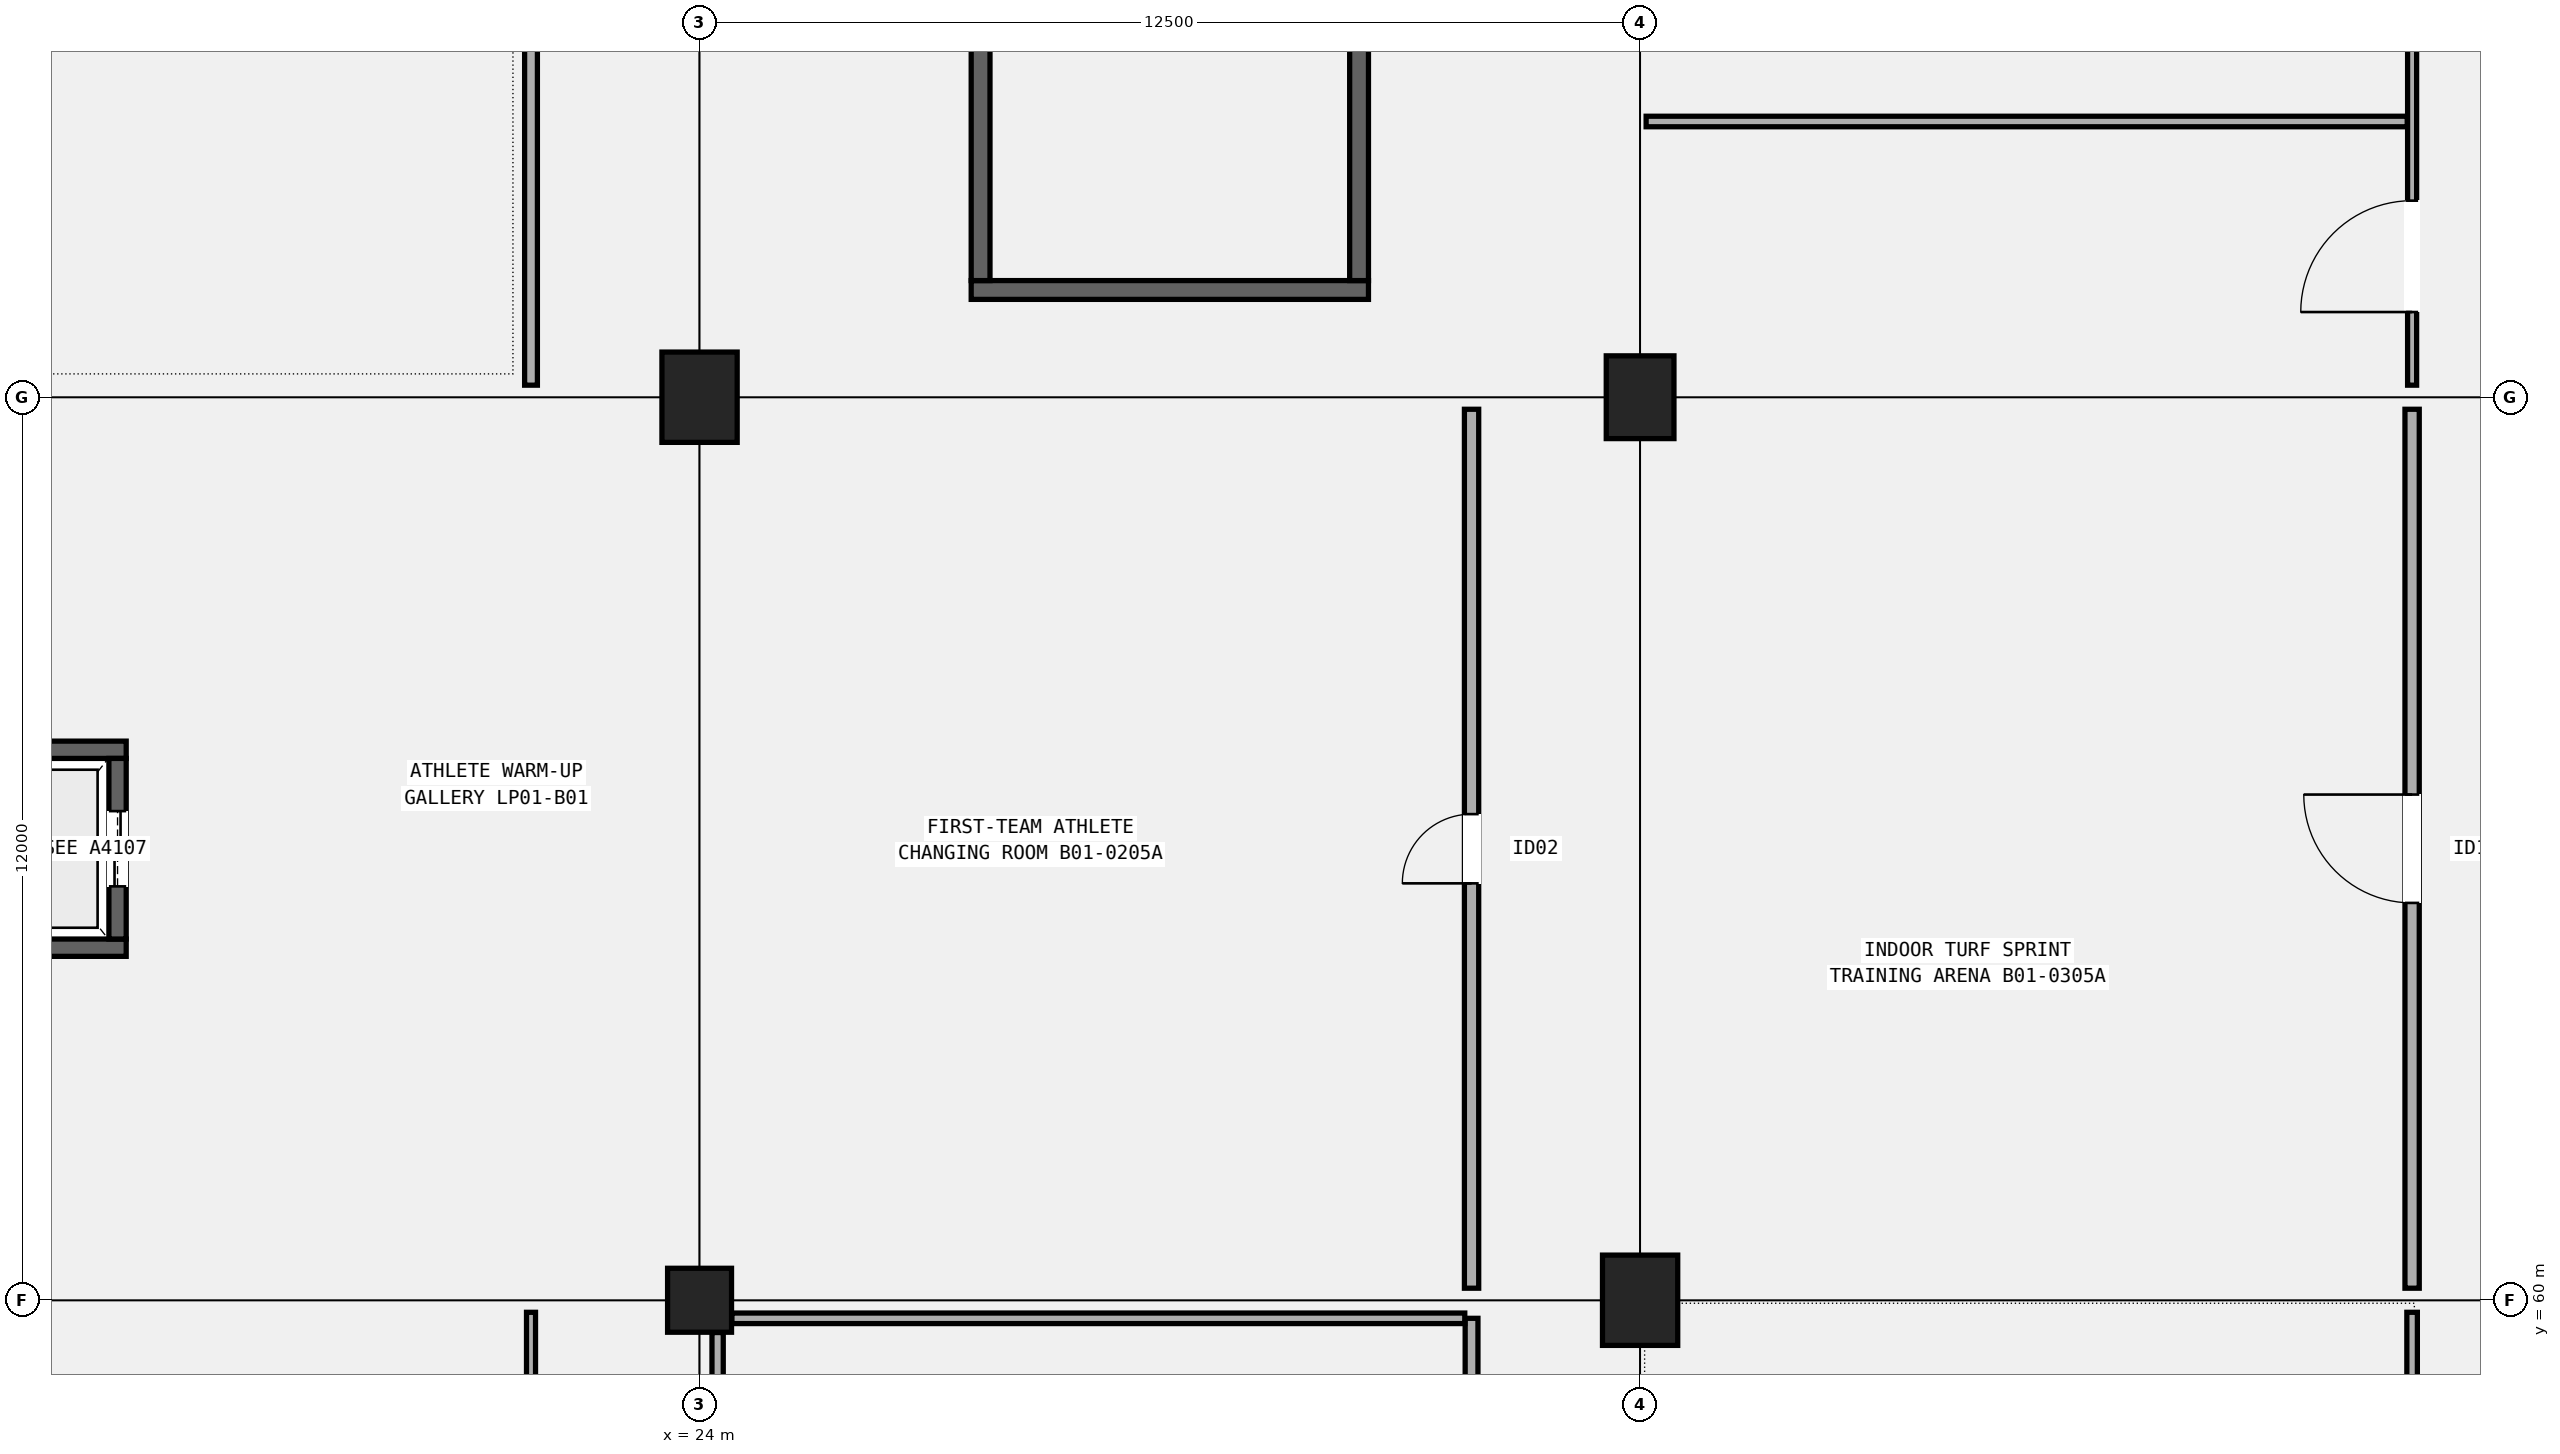
"""IFC4 building model, lengths in metres.
Left out: names, types, materials, properties, quantities, classifications, styles, units other than length and angle.
Written with IfcOpenShell. Run it as: python <this file> out.ifc"""

import sys

from ifc_helpers import new_model, si_unit, direction, frame, frame_2d, origin, origin_2d, place, context, subcontext, project, spatial, rectangle, circle, extrude, element, fill, save


model = new_model("IFC4")
c1 = context("Model", 3, precision=1e-05, world=origin(), true_north=direction((0.0, 1.0)))
c2 = subcontext(c1, "Body", "Model", "MODEL_VIEW")
j1 = project(units=[si_unit("LENGTHUNIT", "METRE"), si_unit("PLANEANGLEUNIT", "RADIAN")], contexts=[c1])
p1 = place(None, origin())
s1 = spatial("IfcSite", under=j1, at=p1, CompositionType="ELEMENT")
p2 = place(p1, origin())
s2 = spatial("IfcBuilding", under=s1, at=p2, CompositionType="ELEMENT")
p3 = place(p2, frame((0.0, 0.0, -4.8)))
s3 = spatial("IfcBuildingStorey", under=s2, at=p3, CompositionType="ELEMENT", Elevation=-4.8)
p4 = place(p3, frame((24.0, 60.0, 0.0), z_axis=(0.0, 0.0, 1.0), x_axis=(1.0, 0.0, 0.0)))
e1 = element("IfcColumn", 1, at=p4, inside=s3, PredefinedType="COLUMN", context=c2, shape_type="SweptSolid", body=[
    extrude(circle(Radius=0.425, at=origin_2d()), origin(), (0.0, 0.0, 1.0), 4.8),
])
for number, where, z_axis, x_axis in (
    (2, (24.0, 72.0, 0.0), (0.0, 0.0, 1.0), (1.0, 0.0, 0.0)),
    (3, (36.5, 60.0, 0.0), (0.0, 0.0, 1.0), (1.0, 0.0, 0.0)),
):
    element("IfcColumn", number, at=place(p3, frame(where, z_axis=z_axis, x_axis=x_axis)), inside=s3, PredefinedType="COLUMN", context=c2, shape_type="SweptSolid", body=[
        extrude(rectangle(XDim=1.0, YDim=1.2, at=origin_2d()), origin(), (0.0, 0.0, 1.0), 4.8),
    ])
p5 = place(p3, frame((36.5, 72.0, 0.0), z_axis=(0.0, 0.0, 1.0), x_axis=(1.0, 0.0, 0.0)))
e4 = element("IfcColumn", 4, at=p5, inside=s3, PredefinedType="COLUMN", context=c2, shape_type="SweptSolid", body=[
    extrude(rectangle(XDim=0.9, YDim=1.1, at=origin_2d()), origin(), (0.0, 0.0, 1.0), 4.8),
])
p6 = place(p3, frame((27.61, 73.425, 0.0), z_axis=(0.0, 0.0, 1.0), x_axis=(1.0, 0.0, 0.0)))
e5 = element("IfcWall", 5, at=p6, inside=s3, PredefinedType="SHEAR", context=c2, shape_type="SweptSolid", body=[
    extrude(rectangle(XDim=5.28, YDim=0.25, at=frame_2d((2.64, 0.0))), origin(), (0.0, 0.0, 1.0), 4.5),
])
for number, where, z_axis, x_axis in (
    (6, (27.735, 73.55, 0.0), (0.0, 0.0, 1.0), (0.0, 1.0, 0.0)),
    (7, (32.765, 73.55, 0.0), (0.0, 0.0, 1.0), (0.0, 1.0, 0.0)),
):
    element("IfcWall", number, at=place(p3, frame(where, z_axis=z_axis, x_axis=x_axis)), inside=s3, PredefinedType="SHEAR", context=c2, shape_type="SweptSolid", body=[
        extrude(rectangle(XDim=8.9, YDim=0.25, at=frame_2d((4.45, 0.0))), origin(), (0.0, 0.0, 1.0), 4.5),
    ])
for number, where, z_axis, x_axis in (
    (8, (14.02, 64.685, -0.65), (0.0, 0.0, 1.0), (1.0, 0.0, 0.0)),
    (9, (14.02, 67.315, -0.65), (0.0, 0.0, 1.0), (1.0, 0.0, 0.0)),
):
    element("IfcWall", number, at=place(p3, frame(where, z_axis=z_axis, x_axis=x_axis)), inside=s3, PredefinedType="SHEAR", context=c2, shape_type="SweptSolid", body=[
        extrude(rectangle(XDim=2.36, YDim=0.23, at=frame_2d((1.18, 0.0))), origin(), (0.0, 0.0, 1.0), 4.5),
    ])
p7 = place(p3, frame((16.265, 64.8, -0.65), z_axis=(0.0, 0.0, 1.0), x_axis=(0.0, 1.0, 0.0)))
e10 = element("IfcWall", 10, at=p7, inside=s3, PredefinedType="SHEAR", context=c2, shape_type="SweptSolid", body=[
    extrude(rectangle(XDim=2.4, YDim=0.23, at=frame_2d((1.2, 0.0))), origin(), (0.0, 0.0, 1.0), 4.5),
])
p8 = place(p7, frame((0.7, 0.0, 0.65)))
e11 = element("IfcOpeningElement", 11, at=p8, cuts=e10, PredefinedType="OPENING", context=c2, shape_type="SweptSolid", body=[
    extrude(rectangle(XDim=1.0, YDim=2.15, at=frame_2d((0.5, 1.075))), frame((0.0, 0.125, 0.0), z_axis=(0.0, -1.0, 0.0), x_axis=(1.0, 0.0, 0.0)), (0.0, 0.0, 1.0), 0.25),
])
p9 = place(p3, frame((21.76, 48.16, 0.0), z_axis=(0.0, 0.0, 1.0), x_axis=(0.0, 1.0, 0.0)))
e12 = element("IfcWall", 12, at=p9, inside=s3, PredefinedType="PARTITIONING", context=c2, shape_type="SweptSolid", body=[
    extrude(rectangle(XDim=11.68, YDim=0.12, at=frame_2d((5.84, 0.0))), origin(), (0.0, 0.0, 1.0), 3.92),
])
p10 = place(p9, frame((1.377, 0.0, 0.0)))
e13 = element("IfcOpeningElement", 13, at=p10, cuts=e12, PredefinedType="OPENING", context=c2, shape_type="SweptSolid", body=[
    extrude(rectangle(XDim=1.3, YDim=2.24, at=frame_2d((0.65, 1.12))), frame((0.0, 0.07, 0.0), z_axis=(0.0, -1.0, 0.0), x_axis=(1.0, 0.0, 0.0)), (0.0, 0.0, 1.0), 0.14),
])
p11 = place(p9, frame((7.282, 0.0, 0.0)))
e14 = element("IfcOpeningElement", 14, at=p11, cuts=e12, PredefinedType="OPENING", context=c2, shape_type="SweptSolid", body=[
    extrude(rectangle(XDim=1.33, YDim=2.22, at=frame_2d((0.665, 1.11))), frame((0.0, 0.07, 0.0), z_axis=(0.0, -1.0, 0.0), x_axis=(1.0, 0.0, 0.0)), (0.0, 0.0, 1.0), 0.14),
])
p12 = place(p3, frame((21.76, 72.16, 0.0), z_axis=(0.0, 0.0, 1.0), x_axis=(0.0, 1.0, 0.0)))
e15 = element("IfcWall", 15, at=p12, inside=s3, PredefinedType="PARTITIONING", context=c2, shape_type="SweptSolid", body=[
    extrude(rectangle(XDim=11.68, YDim=0.17, at=frame_2d((5.84, 0.0))), origin(), (0.0, 0.0, 1.0), 3.92),
])
p13 = place(p12, frame((5.16, 0.0, 0.0)))
e16 = element("IfcOpeningElement", 16, at=p13, cuts=e15, PredefinedType="OPENING", context=c2, shape_type="SweptSolid", body=[
    extrude(rectangle(XDim=1.36, YDim=2.25, at=frame_2d((0.68, 1.125))), frame((0.0, 0.095, 0.0), z_axis=(0.0, -1.0, 0.0), x_axis=(1.0, 0.0, 0.0)), (0.0, 0.0, 1.0), 0.19),
])
p14 = place(p3, frame((34.26, 48.24, 0.0), z_axis=(0.0, 0.0, 1.0), x_axis=(0.0, 1.0, 0.0)))
e17 = element("IfcWall", 17, at=p14, inside=s3, PredefinedType="PARTITIONING", context=c2, shape_type="SweptSolid", body=[
    extrude(rectangle(XDim=11.52, YDim=0.17, at=frame_2d((5.76, 0.0))), origin(), (0.0, 0.0, 1.0), 3.92),
])
p15 = place(p14, frame((0.523, 0.0, 0.0)))
e18 = element("IfcOpeningElement", 18, at=p15, cuts=e17, PredefinedType="OPENING", context=c2, shape_type="SweptSolid", body=[
    extrude(rectangle(XDim=1.7, YDim=2.32, at=frame_2d((0.85, 1.16))), frame((0.0, 0.095, 0.0), z_axis=(0.0, -1.0, 0.0), x_axis=(1.0, 0.0, 0.0)), (0.0, 0.0, 1.0), 0.19),
])
p16 = place(p14, frame((4.06, 0.0, 0.0)))
e19 = element("IfcOpeningElement", 19, at=p16, cuts=e17, PredefinedType="OPENING", context=c2, shape_type="SweptSolid", body=[
    extrude(rectangle(XDim=1.76, YDim=2.3, at=frame_2d((0.88, 1.15))), frame((0.0, 0.095, 0.0), z_axis=(0.0, -1.0, 0.0), x_axis=(1.0, 0.0, 0.0)), (0.0, 0.0, 1.0), 0.19),
])
p17 = place(p14, frame((8.876, 0.0, 0.0)))
e20 = element("IfcOpeningElement", 20, at=p17, cuts=e17, PredefinedType="OPENING", context=c2, shape_type="SweptSolid", body=[
    extrude(rectangle(XDim=0.9, YDim=2.06, at=frame_2d((0.45, 1.03))), frame((0.0, 0.095, 0.0), z_axis=(0.0, -1.0, 0.0), x_axis=(1.0, 0.0, 0.0)), (0.0, 0.0, 1.0), 0.19),
])
p18 = place(p3, frame((24.429, 59.76, 0.0), z_axis=(0.0, 0.0, 1.0), x_axis=(1.0, 0.0, 0.0)))
e21 = element("IfcWall", 21, at=p18, inside=s3, PredefinedType="PARTITIONING", context=c2, shape_type="SweptSolid", body=[
    extrude(rectangle(XDim=9.741, YDim=0.14, at=frame_2d((4.871, 0.0))), origin(), (0.0, 0.0, 1.0), 3.62),
])
p19 = place(p3, frame((24.24, 48.504, 0.0), z_axis=(0.0, 0.0, 1.0), x_axis=(0.0, 1.0, 0.0)))
e22 = element("IfcWall", 22, at=p19, inside=s3, PredefinedType="PARTITIONING", context=c2, shape_type="SweptSolid", body=[
    extrude(rectangle(XDim=11.067, YDim=0.15, at=frame_2d((5.534, 0.0))), origin(), (0.0, 0.0, 1.0), 3.52),
])
p20 = place(p3, frame((34.26, 60.16, 0.0), z_axis=(0.0, 0.0, 1.0), x_axis=(0.0, 1.0, 0.0)))
e23 = element("IfcWall", 23, at=p20, inside=s3, PredefinedType="PARTITIONING", context=c2, shape_type="SweptSolid", body=[
    extrude(rectangle(XDim=11.68, YDim=0.19, at=frame_2d((5.84, 0.0))), origin(), (0.0, 0.0, 1.0), 3.92),
])
p21 = place(p20, frame((5.38, 0.0, 0.0)))
e24 = element("IfcOpeningElement", 24, at=p21, cuts=e23, PredefinedType="OPENING", context=c2, shape_type="SweptSolid", body=[
    extrude(rectangle(XDim=0.92, YDim=2.1, at=frame_2d((0.46, 1.05))), frame((0.0, 0.105, 0.0), z_axis=(0.0, -1.0, 0.0), x_axis=(1.0, 0.0, 0.0)), (0.0, 0.0, 1.0), 0.21),
])
p22 = place(p3, frame((46.76, 48.16, 0.0), z_axis=(0.0, 0.0, 1.0), x_axis=(0.0, 1.0, 0.0)))
e25 = element("IfcWall", 25, at=p22, inside=s3, PredefinedType="PARTITIONING", context=c2, shape_type="SweptSolid", body=[
    extrude(rectangle(XDim=11.68, YDim=0.14, at=frame_2d((5.84, 0.0))), origin(), (0.0, 0.0, 1.0), 3.92),
])
p23 = place(p22, frame((2.404, 0.0, 0.0)))
e26 = element("IfcOpeningElement", 26, at=p23, cuts=e25, PredefinedType="OPENING", context=c2, shape_type="SweptSolid", body=[
    extrude(rectangle(XDim=1.36, YDim=2.25, at=frame_2d((0.68, 1.125))), frame((0.0, 0.08, 0.0), z_axis=(0.0, -1.0, 0.0), x_axis=(1.0, 0.0, 0.0)), (0.0, 0.0, 1.0), 0.16),
])
p24 = place(p22, frame((8.304, 0.0, 0.0)))
e27 = element("IfcOpeningElement", 27, at=p24, cuts=e25, PredefinedType="OPENING", context=c2, shape_type="SweptSolid", body=[
    extrude(rectangle(XDim=1.4, YDim=2.24, at=frame_2d((0.7, 1.12))), frame((0.0, 0.08, 0.0), z_axis=(0.0, -1.0, 0.0), x_axis=(1.0, 0.0, 0.0)), (0.0, 0.0, 1.0), 0.16),
])
p25 = place(p3, frame((46.76, 60.16, 0.0), z_axis=(0.0, 0.0, 1.0), x_axis=(0.0, 1.0, 0.0)))
e28 = element("IfcWall", 28, at=p25, inside=s3, PredefinedType="PARTITIONING", context=c2, shape_type="SweptSolid", body=[
    extrude(rectangle(XDim=11.68, YDim=0.19, at=frame_2d((5.84, 0.0))), origin(), (0.0, 0.0, 1.0), 3.92),
])
p26 = place(p25, frame((5.12, 0.0, 0.0)))
e29 = element("IfcOpeningElement", 29, at=p26, cuts=e28, PredefinedType="OPENING", context=c2, shape_type="SweptSolid", body=[
    extrude(rectangle(XDim=1.44, YDim=2.26, at=frame_2d((0.72, 1.13))), frame((0.0, 0.105, 0.0), z_axis=(0.0, -1.0, 0.0), x_axis=(1.0, 0.0, 0.0)), (0.0, 0.0, 1.0), 0.21),
])
p27 = place(p3, frame((46.76, 72.16, 0.0), z_axis=(0.0, 0.0, 1.0), x_axis=(0.0, 1.0, 0.0)))
e30 = element("IfcWall", 30, at=p27, inside=s3, PredefinedType="PARTITIONING", context=c2, shape_type="SweptSolid", body=[
    extrude(rectangle(XDim=11.68, YDim=0.12, at=frame_2d((5.84, 0.0))), origin(), (0.0, 0.0, 1.0), 3.92),
])
p28 = place(p27, frame((0.972, 0.0, 0.0)))
e31 = element("IfcOpeningElement", 31, at=p28, cuts=e30, PredefinedType="OPENING", context=c2, shape_type="SweptSolid", body=[
    extrude(rectangle(XDim=1.48, YDim=2.24, at=frame_2d((0.74, 1.12))), frame((0.0, 0.07, 0.0), z_axis=(0.0, -1.0, 0.0), x_axis=(1.0, 0.0, 0.0)), (0.0, 0.0, 1.0), 0.14),
])
p29 = place(p27, frame((6.872, 0.0, 0.0)))
e32 = element("IfcOpeningElement", 32, at=p29, cuts=e30, PredefinedType="OPENING", context=c2, shape_type="SweptSolid", body=[
    extrude(rectangle(XDim=1.52, YDim=2.28, at=frame_2d((0.76, 1.14))), frame((0.0, 0.07, 0.0), z_axis=(0.0, -1.0, 0.0), x_axis=(1.0, 0.0, 0.0)), (0.0, 0.0, 1.0), 0.14),
])
p30 = place(p3, frame((36.58, 75.664, 0.0), z_axis=(0.0, 0.0, 1.0), x_axis=(1.0, 0.0, 0.0)))
e33 = element("IfcWall", 33, at=p30, inside=s3, PredefinedType="PARTITIONING", context=c2, shape_type="SweptSolid", body=[
    extrude(rectangle(XDim=10.115, YDim=0.14, at=frame_2d((5.058, 0.0))), origin(), (0.0, 0.0, 1.0), 3.92),
])
p31 = place(p8, origin())
e34 = element("IfcDoor", 34, at=p31, inside=s3, OperationType="DOUBLE_DOOR_SLIDING", PredefinedType="DOOR", context=c2, shape_type="SweptSolid", body=[
    extrude(rectangle(XDim=1.0, YDim=2.15, at=frame_2d((0.5, 1.075))), frame((0.0, 0.025, 0.0), z_axis=(0.0, -1.0, 0.0), x_axis=(1.0, 0.0, 0.0)), (0.0, 0.0, 1.0), 0.05),
])
fill(e11, e34)
p32 = place(p21, origin())
e35 = element("IfcDoor", 35, at=p32, inside=s3, OperationType="SINGLE_SWING_LEFT", PredefinedType="DOOR", context=c2, shape_type="SweptSolid", body=[
    extrude(rectangle(XDim=0.92, YDim=2.1, at=frame_2d((0.46, 1.05))), frame((0.0, 0.025, 0.0), z_axis=(0.0, -1.0, 0.0), x_axis=(1.0, 0.0, 0.0)), (0.0, 0.0, 1.0), 0.05),
])
fill(e24, e35)
p33 = place(p26, origin())
e36 = element("IfcDoor", 36, at=p33, inside=s3, OperationType="SINGLE_SWING_RIGHT", PredefinedType="DOOR", context=c2, shape_type="SweptSolid", body=[
    extrude(rectangle(XDim=1.44, YDim=2.26, at=frame_2d((0.72, 1.13))), frame((0.0, 0.025, 0.0), z_axis=(0.0, -1.0, 0.0), x_axis=(1.0, 0.0, 0.0)), (0.0, 0.0, 1.0), 0.05),
])
fill(e29, e36)
p34 = place(p28, origin())
e37 = element("IfcDoor", 37, at=p34, inside=s3, OperationType="SINGLE_SWING_LEFT", PredefinedType="DOOR", context=c2, shape_type="SweptSolid", body=[
    extrude(rectangle(XDim=1.48, YDim=2.24, at=frame_2d((0.74, 1.12))), frame((0.0, 0.025, 0.0), z_axis=(0.0, -1.0, 0.0), x_axis=(1.0, 0.0, 0.0)), (0.0, 0.0, 1.0), 0.05),
])
fill(e31, e37)
save(model, sys.argv[1])
